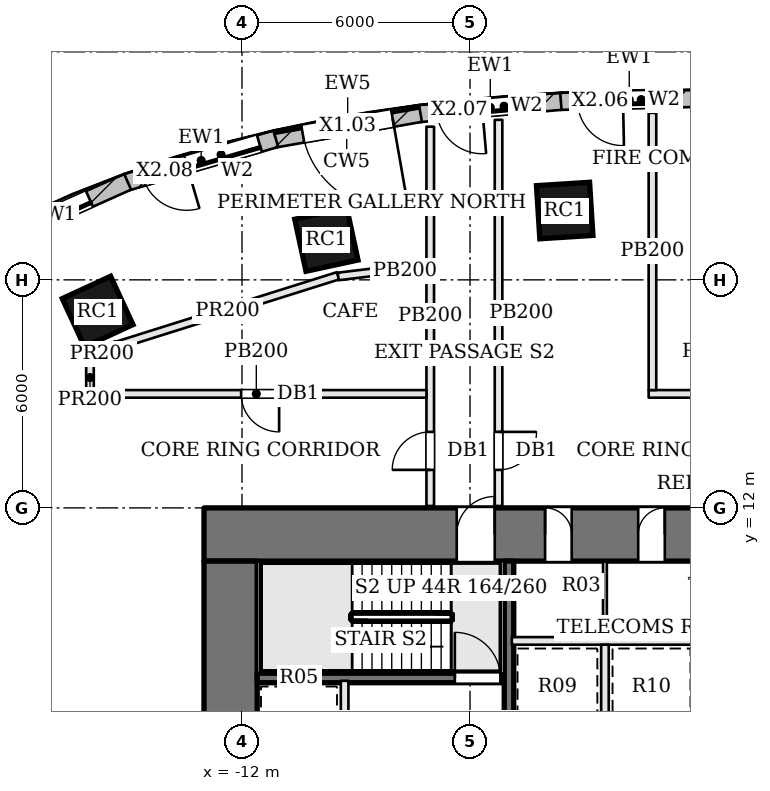
"""IFC4 building model, lengths in metres.
Left out: names, types, materials, properties, quantities, classifications, styles, units other than length and angle.
Written with IfcOpenShell. Run it as: python <this file> out.ifc"""

import sys

from ifc_helpers import new_model, si_unit, direction, frame, frame_2d, origin, origin_2d, place, context, subcontext, project, spatial, rectangle, extrude, element, fill, save


model = new_model("IFC4")
c1 = context("Model", 3, precision=1e-05, world=origin(), true_north=direction((0.0, 1.0)))
c2 = subcontext(c1, "Body", "Model", "MODEL_VIEW")
j1 = project(units=[si_unit("LENGTHUNIT", "METRE"), si_unit("PLANEANGLEUNIT", "RADIAN")], contexts=[c1])
p1 = place(None, origin())
s1 = spatial("IfcSite", under=j1, at=p1, CompositionType="ELEMENT")
p2 = place(p1, origin())
s2 = spatial("IfcBuilding", under=s1, at=p2, CompositionType="ELEMENT")
p3 = place(p2, origin())
s3 = spatial("IfcBuildingStorey", under=s2, at=p3, CompositionType="ELEMENT", Elevation=0.0)
p4 = place(p3, frame((-13.0, 11.3, 0.0), z_axis=(0.0, 0.0, 1.0), x_axis=(1.0, 0.0, 0.0)))
e1 = element("IfcWall", 1, at=p4, inside=s3, PredefinedType="SHEAR", context=c2, shape_type="SweptSolid", body=[
    extrude(rectangle(XDim=26.0, YDim=1.4, at=frame_2d((13.0, 0.0))), origin(), (0.0, 0.0, 1.0), 7.2),
])
p5 = place(p4, frame((8.975, 0.0, 0.0)))
e2 = element("IfcOpeningElement", 2, at=p5, cuts=e1, PredefinedType="OPENING", context=c2, shape_type="SweptSolid", body=[
    extrude(rectangle(XDim=0.7, YDim=2.1, at=frame_2d((0.35, 1.05))), frame((0.0, 0.71, 0.0), z_axis=(0.0, -1.0, 0.0), x_axis=(1.0, 0.0, 0.0)), (0.0, 0.0, 1.0), 1.42),
])
p6 = place(p4, frame((11.425, 0.0, 0.0)))
e3 = element("IfcOpeningElement", 3, at=p6, cuts=e1, PredefinedType="OPENING", context=c2, shape_type="SweptSolid", body=[
    extrude(rectangle(XDim=0.7, YDim=2.1, at=frame_2d((0.35, 1.05))), frame((0.0, 0.71, 0.0), z_axis=(0.0, -1.0, 0.0), x_axis=(1.0, 0.0, 0.0)), (0.0, 0.0, 1.0), 1.42),
])
p7 = place(p4, frame((13.725, 0.0, 0.0)))
e4 = element("IfcOpeningElement", 4, at=p7, cuts=e1, PredefinedType="OPENING", context=c2, shape_type="SweptSolid", body=[
    extrude(rectangle(XDim=1.0, YDim=2.1, at=frame_2d((0.5, 1.05))), frame((0.0, 0.71, 0.0), z_axis=(0.0, -1.0, 0.0), x_axis=(1.0, 0.0, 0.0)), (0.0, 0.0, 1.0), 1.42),
])
p8 = place(p4, frame((15.65, 0.0, 0.0)))
e5 = element("IfcOpeningElement", 5, at=p8, cuts=e1, PredefinedType="OPENING", context=c2, shape_type="SweptSolid", body=[
    extrude(rectangle(XDim=1.0, YDim=2.1, at=frame_2d((0.5, 1.05))), frame((0.0, 0.71, 0.0), z_axis=(0.0, -1.0, 0.0), x_axis=(1.0, 0.0, 0.0)), (0.0, 0.0, 1.0), 1.42),
])
p9 = place(p4, frame((6.65, 0.0, 0.0)))
e6 = element("IfcOpeningElement", 6, at=p9, cuts=e1, PredefinedType="OPENING", context=c2, shape_type="SweptSolid", body=[
    extrude(rectangle(XDim=1.0, YDim=2.1, at=frame_2d((0.5, 1.05))), frame((0.0, 0.71, 0.0), z_axis=(0.0, -1.0, 0.0), x_axis=(1.0, 0.0, 0.0)), (0.0, 0.0, 1.0), 1.42),
])
p10 = place(p4, frame((18.35, 0.0, 0.0)))
e7 = element("IfcOpeningElement", 7, at=p10, cuts=e1, PredefinedType="OPENING", context=c2, shape_type="SweptSolid", body=[
    extrude(rectangle(XDim=1.0, YDim=2.1, at=frame_2d((0.5, 1.05))), frame((0.0, 0.71, 0.0), z_axis=(0.0, -1.0, 0.0), x_axis=(1.0, 0.0, 0.0)), (0.0, 0.0, 1.0), 1.42),
])
p11 = place(p3, frame((-12.3, -1.6, 0.0), z_axis=(0.0, 0.0, 1.0), x_axis=(0.0, 1.0, 0.0)))
e8 = element("IfcWall", 8, at=p11, inside=s3, PredefinedType="SHEAR", context=c2, shape_type="SweptSolid", body=[
    extrude(rectangle(XDim=12.2, YDim=1.4, at=frame_2d((6.1, 0.0))), origin(), (0.0, 0.0, 1.0), 7.2),
])
p12 = place(p11, frame((3.6, 0.0, 0.0)))
e9 = element("IfcOpeningElement", 9, at=p12, cuts=e8, PredefinedType="OPENING", context=c2, shape_type="SweptSolid", body=[
    extrude(rectangle(XDim=1.8, YDim=2.1, at=frame_2d((0.9, 1.05))), frame((0.0, 0.71, 0.0), z_axis=(0.0, -1.0, 0.0), x_axis=(1.0, 0.0, 0.0)), (0.0, 0.0, 1.0), 1.42),
])
for number, where, z_axis, x_axis in (
    (10, (-3.509, 19.824, 0.0), (0.0, 0.0, 1.0), (-0.998, -0.063, 0.0)),
    (11, (-9.78, 19.058, 0.0), (0.0, 0.0, 1.0), (-0.977, -0.211, 0.0)),
    (12, (-15.799, 17.165, 0.0), (0.0, 0.0, 1.0), (-0.908, -0.419, 0.0)),
):
    element("IfcColumn", number, at=place(p3, frame(where, z_axis=z_axis, x_axis=x_axis)), inside=s3, PredefinedType="COLUMN", context=c2, shape_type="SweptSolid", body=[
        extrude(rectangle(XDim=1.4, YDim=1.4, at=origin_2d()), origin(), (0.0, 0.0, 1.0), 7.2),
    ])
p13 = place(p3, frame((0.005, 22.775, 0.0), z_axis=(0.0, 0.0, 1.0), x_axis=(-0.999769941673, -0.0214490962, 0.0)))
e13 = element("IfcWall", 13, at=p13, inside=s3, PredefinedType="SOLIDWALL", context=c2, shape_type="SweptSolid", body=[
    extrude(rectangle(XDim=3.631, YDim=0.45, at=frame_2d((1.815, 0.0))), origin(), (0.0, 0.0, 1.0), 6.95),
])
p14 = place(p13, frame((0.45, 0.0, 0.9)))
e14 = element("IfcOpeningElement", 14, at=p14, cuts=e13, PredefinedType="OPENING", context=c2, shape_type="SweptSolid", body=[
    extrude(rectangle(XDim=2.1, YDim=5.0, at=frame_2d((1.05, 2.5))), frame((0.0, 0.235, 0.0), z_axis=(0.0, -1.0, 0.0), x_axis=(1.0, 0.0, 0.0)), (0.0, 0.0, 1.0), 0.47),
])
p15 = place(p13, frame((1.981, 0.0, 0.0)))
e15 = element("IfcOpeningElement", 15, at=p15, cuts=e13, PredefinedType="OPENING", context=c2, shape_type="SweptSolid", body=[
    extrude(rectangle(XDim=1.2, YDim=2.4, at=frame_2d((0.6, 1.2))), frame((0.0, 0.235, 0.0), z_axis=(0.0, -1.0, 0.0), x_axis=(1.0, 0.0, 0.0)), (0.0, 0.0, 1.0), 0.47),
])
p16 = place(p3, frame((-3.611, 22.698, 0.0), z_axis=(0.0, 0.0, 1.0), x_axis=(-0.996259982326, -0.086406293838, 0.0)))
e16 = element("IfcWall", 16, at=p16, inside=s3, PredefinedType="SOLIDWALL", context=c2, shape_type="SweptSolid", body=[
    extrude(rectangle(XDim=3.727, YDim=0.45, at=frame_2d((1.863, 0.0))), origin(), (0.0, 0.0, 1.0), 6.95),
])
p17 = place(p16, frame((0.45, 0.0, 0.9)))
e17 = element("IfcOpeningElement", 17, at=p17, cuts=e16, PredefinedType="OPENING", context=c2, shape_type="SweptSolid", body=[
    extrude(rectangle(XDim=2.1, YDim=5.0, at=frame_2d((1.05, 2.5))), frame((0.0, 0.235, 0.0), z_axis=(0.0, -1.0, 0.0), x_axis=(1.0, 0.0, 0.0)), (0.0, 0.0, 1.0), 0.47),
])
p18 = place(p16, frame((2.077, 0.0, 0.0)))
e18 = element("IfcOpeningElement", 18, at=p18, cuts=e16, PredefinedType="OPENING", context=c2, shape_type="SweptSolid", body=[
    extrude(rectangle(XDim=1.2, YDim=2.4, at=frame_2d((0.6, 1.2))), frame((0.0, 0.235, 0.0), z_axis=(0.0, -1.0, 0.0), x_axis=(1.0, 0.0, 0.0)), (0.0, 0.0, 1.0), 0.47),
])
p19 = place(p3, frame((-7.304, 22.378, 0.0), z_axis=(0.0, 0.0, 1.0), x_axis=(-0.984947461591, -0.172853978566, 0.0)))
e19 = element("IfcWall", 19, at=p19, inside=s3, PredefinedType="SOLIDWALL", context=c2, shape_type="SweptSolid", body=[
    extrude(rectangle(XDim=3.888, YDim=0.45, at=frame_2d((1.944, 0.0))), origin(), (0.0, 0.0, 1.0), 3.55),
])
p20 = place(p19, frame((0.744, 0.0, 0.0)))
e20 = element("IfcOpeningElement", 20, at=p20, cuts=e19, PredefinedType="OPENING", context=c2, shape_type="SweptSolid", body=[
    extrude(rectangle(XDim=2.4, YDim=3.2, at=frame_2d((1.2, 1.6))), frame((0.0, 0.235, 0.0), z_axis=(0.0, -1.0, 0.0), x_axis=(1.0, 0.0, 0.0)), (0.0, 0.0, 1.0), 0.47),
])
p21 = place(p3, frame((-11.11, 21.712, 0.0), z_axis=(0.0, 0.0, 1.0), x_axis=(-0.960186274122, -0.279360553743, 0.0)))
e21 = element("IfcWall", 21, at=p21, inside=s3, PredefinedType="SOLIDWALL", context=c2, shape_type="SweptSolid", body=[
    extrude(rectangle(XDim=4.091, YDim=0.45, at=frame_2d((2.045, 0.0))), origin(), (0.0, 0.0, 1.0), 6.95),
])
p22 = place(p21, frame((0.45, 0.0, 0.9)))
e22 = element("IfcOpeningElement", 22, at=p22, cuts=e21, PredefinedType="OPENING", context=c2, shape_type="SweptSolid", body=[
    extrude(rectangle(XDim=2.1, YDim=5.0, at=frame_2d((1.05, 2.5))), frame((0.0, 0.235, 0.0), z_axis=(0.0, -1.0, 0.0), x_axis=(1.0, 0.0, 0.0)), (0.0, 0.0, 1.0), 0.47),
])
p23 = place(p21, frame((2.441, 0.0, 0.0)))
e23 = element("IfcOpeningElement", 23, at=p23, cuts=e21, PredefinedType="OPENING", context=c2, shape_type="SweptSolid", body=[
    extrude(rectangle(XDim=1.2, YDim=2.4, at=frame_2d((0.6, 1.2))), frame((0.0, 0.235, 0.0), z_axis=(0.0, -1.0, 0.0), x_axis=(1.0, 0.0, 0.0)), (0.0, 0.0, 1.0), 0.47),
])
p24 = place(p3, frame((-15.009, 20.58, 0.0), z_axis=(0.0, 0.0, 1.0), x_axis=(-0.912571415594, -0.408917365052, 0.0)))
e24 = element("IfcWall", 24, at=p24, inside=s3, PredefinedType="SOLIDWALL", context=c2, shape_type="SweptSolid", body=[
    extrude(rectangle(XDim=4.301, YDim=0.45, at=frame_2d((2.15, 0.0))), origin(), (0.0, 0.0, 1.0), 6.95),
])
p25 = place(p24, frame((1.101, 0.0, 0.9)))
e25 = element("IfcOpeningElement", 25, at=p25, cuts=e24, PredefinedType="OPENING", context=c2, shape_type="SweptSolid", body=[
    extrude(rectangle(XDim=2.1, YDim=5.0, at=frame_2d((1.05, 2.5))), frame((0.0, 0.235, 0.0), z_axis=(0.0, -1.0, 0.0), x_axis=(1.0, 0.0, 0.0)), (0.0, 0.0, 1.0), 0.47),
])
p26 = place(p3, frame((-11.6, 7.525, 0.0), z_axis=(0.0, 0.0, 1.0), x_axis=(1.0, 0.0, 0.0)))
e26 = element("IfcWall", 26, at=p26, inside=s3, PredefinedType="SOLIDWALL", context=c2, shape_type="SweptSolid", body=[
    extrude(rectangle(XDim=6.5, YDim=0.25, at=frame_2d((3.25, 0.0))), origin(), (0.0, 0.0, 1.0), 6.95),
])
p27 = place(p26, frame((5.2, 0.0, 0.0)))
e27 = element("IfcOpeningElement", 27, at=p27, cuts=e26, PredefinedType="OPENING", context=c2, shape_type="SweptSolid", body=[
    extrude(rectangle(XDim=1.2, YDim=2.1, at=frame_2d((0.6, 1.05))), frame((0.0, 0.135, 0.0), z_axis=(0.0, -1.0, 0.0), x_axis=(1.0, 0.0, 0.0)), (0.0, 0.0, 1.0), 0.27),
])
p28 = place(p3, frame((-9.3, 4.45, 0.0), z_axis=(0.0, 0.0, 1.0), x_axis=(0.0, 1.0, 0.0)))
e28 = element("IfcWall", 28, at=p28, inside=s3, PredefinedType="SOLIDWALL", context=c2, shape_type="SweptSolid", body=[
    extrude(rectangle(XDim=3.0, YDim=0.2, at=frame_2d((1.5, 0.0))), origin(), (0.0, 0.0, 1.0), 6.95),
])
p29 = place(p3, frame((-4.975, -1.6, 0.0), z_axis=(0.0, 0.0, 1.0), x_axis=(0.0, 1.0, 0.0)))
e29 = element("IfcWall", 29, at=p29, inside=s3, PredefinedType="SOLIDWALL", context=c2, shape_type="SweptSolid", body=[
    extrude(rectangle(XDim=12.2, YDim=0.25, at=frame_2d((6.1, 0.0))), origin(), (0.0, 0.0, 1.0), 6.95),
])
p30 = place(p29, frame((4.65, 0.0, 0.0)))
e30 = element("IfcOpeningElement", 30, at=p30, cuts=e29, PredefinedType="OPENING", context=c2, shape_type="SweptSolid", body=[
    extrude(rectangle(XDim=1.2, YDim=2.1, at=frame_2d((0.6, 1.05))), frame((0.0, 0.135, 0.0), z_axis=(0.0, -1.0, 0.0), x_axis=(1.0, 0.0, 0.0)), (0.0, 0.0, 1.0), 0.27),
])
p31 = place(p3, frame((-4.9, 8.5, 0.0), z_axis=(0.0, 0.0, 1.0), x_axis=(1.0, 0.0, 0.0)))
e31 = element("IfcWall", 31, at=p31, inside=s3, PredefinedType="SOLIDWALL", context=c2, shape_type="SweptSolid", body=[
    extrude(rectangle(XDim=9.8, YDim=0.2, at=frame_2d((4.9, 0.0))), origin(), (0.0, 0.0, 1.0), 6.95),
])
p32 = place(p3, frame((-2.45, 6.2, 0.0), z_axis=(0.0, 0.0, 1.0), x_axis=(0.0, 1.0, 0.0)))
e32 = element("IfcWall", 32, at=p32, inside=s3, PredefinedType="SOLIDWALL", context=c2, shape_type="SweptSolid", body=[
    extrude(rectangle(XDim=2.2, YDim=0.2, at=frame_2d((1.1, 0.0))), origin(), (0.0, 0.0, 1.0), 6.95),
])
p33 = place(p3, frame((-2.45, 8.6, 0.0), z_axis=(0.0, 0.0, 1.0), x_axis=(0.0, 1.0, 0.0)))
e33 = element("IfcWall", 33, at=p33, inside=s3, PredefinedType="PARTITIONING", context=c2, shape_type="SweptSolid", body=[
    extrude(rectangle(XDim=2.0, YDim=0.1, at=frame_2d((1.0, 0.0))), origin(), (0.0, 0.0, 1.0), 6.95),
])
p34 = place(p3, frame((-7.047, 12.05, 0.0), z_axis=(0.0, 0.0, 1.0), x_axis=(0.0, 1.0, 0.0)))
e34 = element("IfcWall", 34, at=p34, inside=s3, PredefinedType="PARTITIONING", context=c2, shape_type="SweptSolid", body=[
    extrude(rectangle(XDim=9.98, YDim=0.2, at=frame_2d((4.99, 0.0))), origin(), (0.0, 0.0, 1.0), 6.23),
])
p35 = place(p34, frame((0.95, 0.0, 0.0)))
e35 = element("IfcOpeningElement", 35, at=p35, cuts=e34, PredefinedType="OPENING", context=c2, shape_type="SweptSolid", body=[
    extrude(rectangle(XDim=1.0, YDim=2.1, at=frame_2d((0.5, 1.05))), frame((0.0, 0.11, 0.0), z_axis=(0.0, -1.0, 0.0), x_axis=(1.0, 0.0, 0.0)), (0.0, 0.0, 1.0), 0.22),
])
p36 = place(p3, frame((-5.25, 22.21, 0.0), z_axis=(0.0, 0.0, 1.0), x_axis=(0.0, -1.0, 0.0)))
e36 = element("IfcWall", 36, at=p36, inside=s3, PredefinedType="PARTITIONING", context=c2, shape_type="SweptSolid", body=[
    extrude(rectangle(XDim=10.16, YDim=0.2, at=frame_2d((5.08, 0.0))), origin(), (0.0, 0.0, 1.0), 6.23),
])
p37 = place(p36, frame((8.21, 0.0, 0.0)))
e37 = element("IfcOpeningElement", 37, at=p37, cuts=e36, PredefinedType="OPENING", context=c2, shape_type="SweptSolid", body=[
    extrude(rectangle(XDim=1.0, YDim=2.1, at=frame_2d((0.5, 1.05))), frame((0.0, 0.11, 0.0), z_axis=(0.0, -1.0, 0.0), x_axis=(1.0, 0.0, 0.0)), (0.0, 0.0, 1.0), 0.22),
])
p38 = place(p3, frame((2.15, 15.0, 0.0), z_axis=(0.0, 0.0, 1.0), x_axis=(-1.0, 0.0, 0.0)))
e38 = element("IfcWall", 38, at=p38, inside=s3, PredefinedType="PARTITIONING", context=c2, shape_type="SweptSolid", body=[
    extrude(rectangle(XDim=3.45, YDim=0.2, at=frame_2d((1.725, 0.0))), origin(), (0.0, 0.0, 1.0), 6.23),
])
p39 = place(p38, frame((1.225, 0.0, 0.0)))
e39 = element("IfcOpeningElement", 39, at=p39, cuts=e38, PredefinedType="OPENING", context=c2, shape_type="SweptSolid", body=[
    extrude(rectangle(XDim=1.0, YDim=2.1, at=frame_2d((0.5, 1.05))), frame((0.0, 0.11, 0.0), z_axis=(0.0, -1.0, 0.0), x_axis=(1.0, 0.0, 0.0)), (0.0, 0.0, 1.0), 0.22),
])
p40 = place(p3, frame((-1.2, 15.1, 0.0), z_axis=(0.0, 0.0, 1.0), x_axis=(0.0, 1.0, 0.0)))
e40 = element("IfcWall", 40, at=p40, inside=s3, PredefinedType="PARTITIONING", context=c2, shape_type="SweptSolid", body=[
    extrude(rectangle(XDim=7.294, YDim=0.2, at=frame_2d((3.647, 0.0))), origin(), (0.0, 0.0, 1.0), 6.23),
])
p41 = place(p3, frame((-16.085, 15.805, 0.0), z_axis=(0.0, 0.0, 1.0), x_axis=(0.847119078257, 0.531403111822, 0.0)))
e41 = element("IfcWall", 41, at=p41, inside=s3, PredefinedType="PARTITIONING", context=c2, shape_type="SweptSolid", body=[
    extrude(rectangle(XDim=0.937, YDim=0.2, at=frame_2d((0.469, 0.0))), origin(), (0.0, 0.0, 1.0), 6.58),
])
p42 = place(p3, frame((-15.281, 16.28, 0.0), z_axis=(0.0, 0.0, 1.0), x_axis=(0.953923236658, 0.300050759979, 0.0)))
e42 = element("IfcWall", 42, at=p42, inside=s3, PredefinedType="PARTITIONING", context=c2, shape_type="SweptSolid", body=[
    extrude(rectangle(XDim=6.089, YDim=0.2, at=frame_2d((3.044, 0.0))), origin(), (0.0, 0.0, 1.0), 6.58),
])
p43 = place(p3, frame((-9.469, 18.089, 0.0), z_axis=(0.0, 0.0, 1.0), x_axis=(0.992662990312, 0.120913968027, 0.0)))
e43 = element("IfcWall", 43, at=p43, inside=s3, PredefinedType="PARTITIONING", context=c2, shape_type="SweptSolid", body=[
    extrude(rectangle(XDim=2.34, YDim=0.2, at=frame_2d((1.17, 0.0))), origin(), (0.0, 0.0, 1.0), 6.23),
])
p44 = place(p3, frame((-7.147, 15.0, 0.0), z_axis=(0.0, 0.0, 1.0), x_axis=(-1.0, 0.0, 0.0)))
e44 = element("IfcWall", 44, at=p44, inside=s3, PredefinedType="PARTITIONING", context=c2, shape_type="SweptSolid", body=[
    extrude(rectangle(XDim=8.953, YDim=0.2, at=frame_2d((4.477, 0.0))), origin(), (0.0, 0.0, 1.0), 6.23),
])
p45 = place(p44, frame((3.876, 0.0, 0.0)))
e45 = element("IfcOpeningElement", 45, at=p45, cuts=e44, PredefinedType="OPENING", context=c2, shape_type="SweptSolid", body=[
    extrude(rectangle(XDim=1.0, YDim=2.1, at=frame_2d((0.5, 1.05))), frame((0.0, 0.11, 0.0), z_axis=(0.0, -1.0, 0.0), x_axis=(1.0, 0.0, 0.0)), (0.0, 0.0, 1.0), 0.22),
])
p46 = place(p3, frame((-16.0, 15.1, 0.0), z_axis=(0.0, 0.0, 1.0), x_axis=(0.0, 1.0, 0.0)))
e46 = element("IfcWall", 46, at=p46, inside=s3, PredefinedType="PARTITIONING", context=c2, shape_type="SweptSolid", body=[
    extrude(rectangle(XDim=0.658, YDim=0.2, at=frame_2d((0.329, 0.0))), origin(), (0.0, 0.0, 1.0), 6.58),
])
p47 = place(p14, origin())
e47 = element("IfcWindow", 47, at=p47, inside=s3, PartitioningType="SINGLE_PANEL", PredefinedType="WINDOW", context=c2, shape_type="SweptSolid", body=[
    extrude(rectangle(XDim=2.1, YDim=5.0, at=frame_2d((1.05, 2.5))), frame((0.0, 0.135, 0.0), z_axis=(0.0, -1.0, 0.0), x_axis=(1.0, 0.0, 0.0)), (0.0, 0.0, 1.0), 0.06),
])
fill(e14, e47)
p48 = place(p15, frame((1.2, 0.0, 0.0), z_axis=(0.0, 0.0, 1.0), x_axis=(-1.0, 0.0, 0.0)))
e48 = element("IfcDoor", 48, at=p48, inside=s3, OperationType="SINGLE_SWING_LEFT", PredefinedType="DOOR", context=c2, shape_type="SweptSolid", body=[
    extrude(rectangle(XDim=1.2, YDim=2.4, at=frame_2d((0.6, 1.2))), frame((0.0, 0.025, 0.0), z_axis=(0.0, -1.0, 0.0), x_axis=(1.0, 0.0, 0.0)), (0.0, 0.0, 1.0), 0.05),
])
fill(e15, e48)
p49 = place(p17, origin())
e49 = element("IfcWindow", 49, at=p49, inside=s3, PartitioningType="SINGLE_PANEL", PredefinedType="WINDOW", context=c2, shape_type="SweptSolid", body=[
    extrude(rectangle(XDim=2.1, YDim=5.0, at=frame_2d((1.05, 2.5))), frame((0.0, 0.135, 0.0), z_axis=(0.0, -1.0, 0.0), x_axis=(1.0, 0.0, 0.0)), (0.0, 0.0, 1.0), 0.06),
])
fill(e17, e49)
p50 = place(p18, frame((1.2, 0.0, 0.0), z_axis=(0.0, 0.0, 1.0), x_axis=(-1.0, 0.0, 0.0)))
e50 = element("IfcDoor", 50, at=p50, inside=s3, OperationType="SINGLE_SWING_LEFT", PredefinedType="DOOR", context=c2, shape_type="SweptSolid", body=[
    extrude(rectangle(XDim=1.2, YDim=2.4, at=frame_2d((0.6, 1.2))), frame((0.0, 0.025, 0.0), z_axis=(0.0, -1.0, 0.0), x_axis=(1.0, 0.0, 0.0)), (0.0, 0.0, 1.0), 0.05),
])
fill(e18, e50)
p51 = place(p20, origin())
e51 = element("IfcDoor", 51, at=p51, inside=s3, OperationType="DOUBLE_DOOR_DOUBLE_SWING", PredefinedType="DOOR", context=c2, shape_type="SweptSolid", body=[
    extrude(rectangle(XDim=2.4, YDim=3.2, at=frame_2d((1.2, 1.6))), frame((0.0, 0.025, 0.0), z_axis=(0.0, -1.0, 0.0), x_axis=(1.0, 0.0, 0.0)), (0.0, 0.0, 1.0), 0.05),
])
fill(e20, e51)
p52 = place(p22, origin())
e52 = element("IfcWindow", 52, at=p52, inside=s3, PartitioningType="SINGLE_PANEL", PredefinedType="WINDOW", context=c2, shape_type="SweptSolid", body=[
    extrude(rectangle(XDim=2.1, YDim=5.0, at=frame_2d((1.05, 2.5))), frame((0.0, 0.135, 0.0), z_axis=(0.0, -1.0, 0.0), x_axis=(1.0, 0.0, 0.0)), (0.0, 0.0, 1.0), 0.06),
])
fill(e22, e52)
p53 = place(p23, frame((1.2, 0.0, 0.0), z_axis=(0.0, 0.0, 1.0), x_axis=(-1.0, 0.0, 0.0)))
e53 = element("IfcDoor", 53, at=p53, inside=s3, OperationType="SINGLE_SWING_LEFT", PredefinedType="DOOR", context=c2, shape_type="SweptSolid", body=[
    extrude(rectangle(XDim=1.2, YDim=2.4, at=frame_2d((0.6, 1.2))), frame((0.0, 0.025, 0.0), z_axis=(0.0, -1.0, 0.0), x_axis=(1.0, 0.0, 0.0)), (0.0, 0.0, 1.0), 0.05),
])
fill(e23, e53)
p54 = place(p25, origin())
e54 = element("IfcWindow", 54, at=p54, inside=s3, PartitioningType="SINGLE_PANEL", PredefinedType="WINDOW", context=c2, shape_type="SweptSolid", body=[
    extrude(rectangle(XDim=2.1, YDim=5.0, at=frame_2d((1.05, 2.5))), frame((0.0, 0.135, 0.0), z_axis=(0.0, -1.0, 0.0), x_axis=(1.0, 0.0, 0.0)), (0.0, 0.0, 1.0), 0.06),
])
fill(e25, e54)
p55 = place(p27, origin())
e55 = element("IfcDoor", 55, at=p55, inside=s3, OperationType="SINGLE_SWING_LEFT", PredefinedType="DOOR", context=c2, shape_type="SweptSolid", body=[
    extrude(rectangle(XDim=1.2, YDim=2.1, at=frame_2d((0.6, 1.05))), frame((0.0, 0.025, 0.0), z_axis=(0.0, -1.0, 0.0), x_axis=(1.0, 0.0, 0.0)), (0.0, 0.0, 1.0), 0.05),
])
fill(e27, e55)
p56 = place(p5, origin())
e56 = element("IfcDoor", 56, at=p56, inside=s3, OperationType="SINGLE_SWING_LEFT", PredefinedType="DOOR", context=c2, shape_type="SweptSolid", body=[
    extrude(rectangle(XDim=0.7, YDim=2.1, at=frame_2d((0.35, 1.05))), frame((0.0, 0.025, 0.0), z_axis=(0.0, -1.0, 0.0), x_axis=(1.0, 0.0, 0.0)), (0.0, 0.0, 1.0), 0.05),
])
fill(e2, e56)
p57 = place(p6, origin())
e57 = element("IfcDoor", 57, at=p57, inside=s3, OperationType="SINGLE_SWING_RIGHT", PredefinedType="DOOR", context=c2, shape_type="SweptSolid", body=[
    extrude(rectangle(XDim=0.7, YDim=2.1, at=frame_2d((0.35, 1.05))), frame((0.0, 0.025, 0.0), z_axis=(0.0, -1.0, 0.0), x_axis=(1.0, 0.0, 0.0)), (0.0, 0.0, 1.0), 0.05),
])
fill(e3, e57)
p58 = place(p9, origin())
e58 = element("IfcDoor", 58, at=p58, inside=s3, OperationType="SINGLE_SWING_RIGHT", PredefinedType="DOOR", context=c2, shape_type="SweptSolid", body=[
    extrude(rectangle(XDim=1.0, YDim=2.1, at=frame_2d((0.5, 1.05))), frame((0.0, 0.025, 0.0), z_axis=(0.0, -1.0, 0.0), x_axis=(1.0, 0.0, 0.0)), (0.0, 0.0, 1.0), 0.05),
])
fill(e6, e58)
p59 = place(p37, origin())
e59 = element("IfcDoor", 59, at=p59, inside=s3, OperationType="SINGLE_SWING_LEFT", PredefinedType="DOOR", context=c2, shape_type="SweptSolid", body=[
    extrude(rectangle(XDim=1.0, YDim=2.1, at=frame_2d((0.5, 1.05))), frame((0.0, 0.025, 0.0), z_axis=(0.0, -1.0, 0.0), x_axis=(1.0, 0.0, 0.0)), (0.0, 0.0, 1.0), 0.05),
])
fill(e37, e59)
p60 = place(p35, origin())
e60 = element("IfcDoor", 60, at=p60, inside=s3, OperationType="SINGLE_SWING_LEFT", PredefinedType="DOOR", context=c2, shape_type="SweptSolid", body=[
    extrude(rectangle(XDim=1.0, YDim=2.1, at=frame_2d((0.5, 1.05))), frame((0.0, 0.025, 0.0), z_axis=(0.0, -1.0, 0.0), x_axis=(1.0, 0.0, 0.0)), (0.0, 0.0, 1.0), 0.05),
])
fill(e35, e60)
p61 = place(p45, origin())
e61 = element("IfcDoor", 61, at=p61, inside=s3, OperationType="SINGLE_SWING_LEFT", PredefinedType="DOOR", context=c2, shape_type="SweptSolid", body=[
    extrude(rectangle(XDim=1.0, YDim=2.1, at=frame_2d((0.5, 1.05))), frame((0.0, 0.025, 0.0), z_axis=(0.0, -1.0, 0.0), x_axis=(1.0, 0.0, 0.0)), (0.0, 0.0, 1.0), 0.05),
])
fill(e45, e61)
save(model, sys.argv[1])
